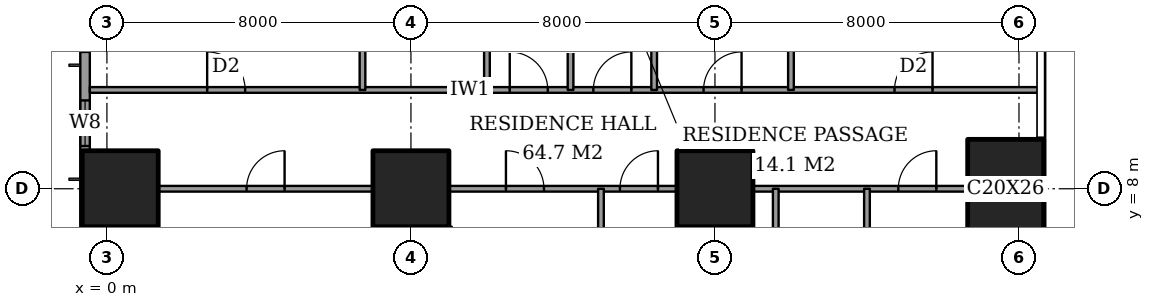
"""IFC4 building model, lengths in metres.
Left out: names, types, materials, properties, quantities, classifications, styles, units other than length and angle.
Written with IfcOpenShell. Run it as: python <this file> out.ifc"""

import sys

from ifc_helpers import new_model, si_unit, direction, frame, frame_2d, origin, origin_2d, place, context, subcontext, project, spatial, rectangle, extrude, element, fill, save


model = new_model("IFC4")
c1 = context("Model", 3, precision=1e-05, world=origin(), true_north=direction((0.0, 1.0)))
c2 = subcontext(c1, "Body", "Model", "MODEL_VIEW")
j1 = project(units=[si_unit("LENGTHUNIT", "METRE"), si_unit("PLANEANGLEUNIT", "RADIAN")], contexts=[c1])
p1 = place(None, origin())
s1 = spatial("IfcSite", under=j1, at=p1, CompositionType="ELEMENT")
p2 = place(p1, origin())
s2 = spatial("IfcBuilding", under=s1, at=p2, CompositionType="ELEMENT")
p3 = place(p2, frame((0.0, 0.0, 44.0)))
s3 = spatial("IfcBuildingStorey", under=s2, at=p3, CompositionType="ELEMENT", Elevation=44.0)
for number, where, z_axis, x_axis in (
    (1, (0.35, 8.0, 0.0), (0.0, 0.0, 1.0), (1.0, 0.0, 0.0)),
    (2, (8.0, 8.0, 0.0), (0.0, 0.0, 1.0), (1.0, 0.0, 0.0)),
    (3, (16.0, 8.0, 0.0), (0.0, 0.0, 1.0), (1.0, 0.0, 0.0)),
):
    element("IfcColumn", number, at=place(p3, frame(where, z_axis=z_axis, x_axis=x_axis)), inside=s3, PredefinedType="COLUMN", context=c2, shape_type="SweptSolid", body=[
        extrude(rectangle(XDim=2.0, YDim=2.0, at=origin_2d()), origin(), (0.0, 0.0, 1.0), 3.6),
    ])
p4 = place(p3, frame((23.65, 8.0, 0.0), z_axis=(0.0, 0.0, 1.0), x_axis=(1.0, 0.0, 0.0)))
e4 = element("IfcColumn", 4, at=p4, inside=s3, PredefinedType="COLUMN", context=c2, shape_type="SweptSolid", body=[
    extrude(rectangle(XDim=2.0, YDim=2.6, at=origin_2d()), origin(), (0.0, 0.0, 1.0), 3.6),
])
p5 = place(p3, frame((-0.575, 44.825, 0.0), z_axis=(0.0, 0.0, 1.0), x_axis=(0.0, -1.0, 0.0)))
e5 = element("IfcWall", 5, at=p5, inside=s3, PredefinedType="SOLIDWALL", context=c2, shape_type="SweptSolid", body=[
    extrude(rectangle(XDim=41.65, YDim=0.25, at=frame_2d((20.825, 0.0))), origin(), (0.0, 0.0, 1.0), 3.6),
])
p6 = place(p5, frame((0.775, 0.0, 0.6)))
e6 = element("IfcOpeningElement", 6, at=p6, cuts=e5, PredefinedType="OPENING", context=c2, shape_type="SweptSolid", body=[
    extrude(rectangle(XDim=2.4, YDim=2.0, at=frame_2d((1.2, 1.0))), frame((0.0, 0.135, 0.0), z_axis=(0.0, -1.0, 0.0), x_axis=(1.0, 0.0, 0.0)), (0.0, 0.0, 1.0), 0.27),
])
p7 = place(p5, frame((6.1, 0.0, 0.6)))
e7 = element("IfcOpeningElement", 7, at=p7, cuts=e5, PredefinedType="OPENING", context=c2, shape_type="SweptSolid", body=[
    extrude(rectangle(XDim=1.2, YDim=2.0, at=frame_2d((0.6, 1.0))), frame((0.0, 0.135, 0.0), z_axis=(0.0, -1.0, 0.0), x_axis=(1.0, 0.0, 0.0)), (0.0, 0.0, 1.0), 0.27),
])
p8 = place(p5, frame((8.425, 0.0, 0.6)))
e8 = element("IfcOpeningElement", 8, at=p8, cuts=e5, PredefinedType="OPENING", context=c2, shape_type="SweptSolid", body=[
    extrude(rectangle(XDim=2.4, YDim=2.0, at=frame_2d((1.2, 1.0))), frame((0.0, 0.135, 0.0), z_axis=(0.0, -1.0, 0.0), x_axis=(1.0, 0.0, 0.0)), (0.0, 0.0, 1.0), 0.27),
])
p9 = place(p5, frame((15.625, 0.0, 0.6)))
e9 = element("IfcOpeningElement", 9, at=p9, cuts=e5, PredefinedType="OPENING", context=c2, shape_type="SweptSolid", body=[
    extrude(rectangle(XDim=2.4, YDim=2.0, at=frame_2d((1.2, 1.0))), frame((0.0, 0.135, 0.0), z_axis=(0.0, -1.0, 0.0), x_axis=(1.0, 0.0, 0.0)), (0.0, 0.0, 1.0), 0.27),
])
p10 = place(p5, frame((23.625, 0.0, 0.6)))
e10 = element("IfcOpeningElement", 10, at=p10, cuts=e5, PredefinedType="OPENING", context=c2, shape_type="SweptSolid", body=[
    extrude(rectangle(XDim=2.4, YDim=2.0, at=frame_2d((1.2, 1.0))), frame((0.0, 0.135, 0.0), z_axis=(0.0, -1.0, 0.0), x_axis=(1.0, 0.0, 0.0)), (0.0, 0.0, 1.0), 0.27),
])
p11 = place(p5, frame((30.825, 0.0, 0.6)))
e11 = element("IfcOpeningElement", 11, at=p11, cuts=e5, PredefinedType="OPENING", context=c2, shape_type="SweptSolid", body=[
    extrude(rectangle(XDim=2.4, YDim=2.0, at=frame_2d((1.2, 1.0))), frame((0.0, 0.135, 0.0), z_axis=(0.0, -1.0, 0.0), x_axis=(1.0, 0.0, 0.0)), (0.0, 0.0, 1.0), 0.27),
])
p12 = place(p5, frame((34.5, 0.0, 0.6)))
e12 = element("IfcOpeningElement", 12, at=p12, cuts=e5, PredefinedType="OPENING", context=c2, shape_type="SweptSolid", body=[
    extrude(rectangle(XDim=1.2, YDim=2.0, at=frame_2d((0.6, 1.0))), frame((0.0, 0.135, 0.0), z_axis=(0.0, -1.0, 0.0), x_axis=(1.0, 0.0, 0.0)), (0.0, 0.0, 1.0), 0.27),
])
p13 = place(p5, frame((38.475, 0.0, 0.6)))
e13 = element("IfcOpeningElement", 13, at=p13, cuts=e5, PredefinedType="OPENING", context=c2, shape_type="SweptSolid", body=[
    extrude(rectangle(XDim=2.4, YDim=2.0, at=frame_2d((1.2, 1.0))), frame((0.0, 0.135, 0.0), z_axis=(0.0, -1.0, 0.0), x_axis=(1.0, 0.0, 0.0)), (0.0, 0.0, 1.0), 0.27),
])
p14 = place(p3, frame((1.35, 8.0, 0.0), z_axis=(0.0, 0.0, 1.0), x_axis=(1.0, 0.0, 0.0)))
e14 = element("IfcWall", 14, at=p14, inside=s3, PredefinedType="PARTITIONING", context=c2, shape_type="SweptSolid", body=[
    extrude(rectangle(XDim=5.65, YDim=0.15, at=frame_2d((2.825, 0.0))), origin(), (0.0, 0.0, 1.0), 3.35),
])
p15 = place(p14, frame((2.325, 0.0, 0.0)))
e15 = element("IfcOpeningElement", 15, at=p15, cuts=e14, PredefinedType="OPENING", context=c2, shape_type="SweptSolid", body=[
    extrude(rectangle(XDim=1.0, YDim=2.1, at=frame_2d((0.5, 1.05))), frame((0.0, 0.085, 0.0), z_axis=(0.0, -1.0, 0.0), x_axis=(1.0, 0.0, 0.0)), (0.0, 0.0, 1.0), 0.17),
])
p16 = place(p3, frame((9.0, 8.0, 0.0), z_axis=(0.0, 0.0, 1.0), x_axis=(1.0, 0.0, 0.0)))
e16 = element("IfcWall", 16, at=p16, inside=s3, PredefinedType="PARTITIONING", context=c2, shape_type="SweptSolid", body=[
    extrude(rectangle(XDim=6.0, YDim=0.15, at=frame_2d((3.0, 0.0))), origin(), (0.0, 0.0, 1.0), 3.35),
])
p17 = place(p16, frame((1.5, 0.0, 0.0)))
e17 = element("IfcOpeningElement", 17, at=p17, cuts=e16, PredefinedType="OPENING", context=c2, shape_type="SweptSolid", body=[
    extrude(rectangle(XDim=1.0, YDim=2.1, at=frame_2d((0.5, 1.05))), frame((0.0, 0.085, 0.0), z_axis=(0.0, -1.0, 0.0), x_axis=(1.0, 0.0, 0.0)), (0.0, 0.0, 1.0), 0.17),
])
p18 = place(p16, frame((4.5, 0.0, 0.0)))
e18 = element("IfcOpeningElement", 18, at=p18, cuts=e16, PredefinedType="OPENING", context=c2, shape_type="SweptSolid", body=[
    extrude(rectangle(XDim=1.0, YDim=2.1, at=frame_2d((0.5, 1.05))), frame((0.0, 0.085, 0.0), z_axis=(0.0, -1.0, 0.0), x_axis=(1.0, 0.0, 0.0)), (0.0, 0.0, 1.0), 0.17),
])
p19 = place(p3, frame((17.0, 8.0, 0.0), z_axis=(0.0, 0.0, 1.0), x_axis=(1.0, 0.0, 0.0)))
e19 = element("IfcWall", 19, at=p19, inside=s3, PredefinedType="PARTITIONING", context=c2, shape_type="SweptSolid", body=[
    extrude(rectangle(XDim=5.65, YDim=0.15, at=frame_2d((2.825, 0.0))), origin(), (0.0, 0.0, 1.0), 3.35),
])
p20 = place(p19, frame((3.825, 0.0, 0.0)))
e20 = element("IfcOpeningElement", 20, at=p20, cuts=e19, PredefinedType="OPENING", context=c2, shape_type="SweptSolid", body=[
    extrude(rectangle(XDim=1.0, YDim=2.1, at=frame_2d((0.5, 1.05))), frame((0.0, 0.085, 0.0), z_axis=(0.0, -1.0, 0.0), x_axis=(1.0, 0.0, 0.0)), (0.0, 0.0, 1.0), 0.17),
])
p21 = place(p3, frame((-0.45, 10.6, 0.0), z_axis=(0.0, 0.0, 1.0), x_axis=(1.0, 0.0, 0.0)))
e21 = element("IfcWall", 21, at=p21, inside=s3, PredefinedType="PARTITIONING", context=c2, shape_type="SweptSolid", body=[
    extrude(rectangle(XDim=25.011, YDim=0.15, at=frame_2d((12.505, 0.0))), origin(), (0.0, 0.0, 1.0), 3.35),
])
p22 = place(p21, frame((13.25, 0.0, 0.0)))
e22 = element("IfcOpeningElement", 22, at=p22, cuts=e21, PredefinedType="OPENING", context=c2, shape_type="SweptSolid", body=[
    extrude(rectangle(XDim=1.0, YDim=2.1, at=frame_2d((0.5, 1.05))), frame((0.0, 0.085, 0.0), z_axis=(0.0, -1.0, 0.0), x_axis=(1.0, 0.0, 0.0)), (0.0, 0.0, 1.0), 0.17),
])
p23 = place(p21, frame((3.087, 0.0, 0.0)))
e23 = element("IfcOpeningElement", 23, at=p23, cuts=e21, PredefinedType="OPENING", context=c2, shape_type="SweptSolid", body=[
    extrude(rectangle(XDim=1.0, YDim=2.1, at=frame_2d((0.5, 1.05))), frame((0.0, 0.085, 0.0), z_axis=(0.0, -1.0, 0.0), x_axis=(1.0, 0.0, 0.0)), (0.0, 0.0, 1.0), 0.17),
])
p24 = place(p21, frame((11.05, 0.0, 0.0)))
e24 = element("IfcOpeningElement", 24, at=p24, cuts=e21, PredefinedType="OPENING", context=c2, shape_type="SweptSolid", body=[
    extrude(rectangle(XDim=1.0, YDim=2.1, at=frame_2d((0.5, 1.05))), frame((0.0, 0.085, 0.0), z_axis=(0.0, -1.0, 0.0), x_axis=(1.0, 0.0, 0.0)), (0.0, 0.0, 1.0), 0.17),
])
p25 = place(p21, frame((16.15, 0.0, 0.0)))
e25 = element("IfcOpeningElement", 25, at=p25, cuts=e21, PredefinedType="OPENING", context=c2, shape_type="SweptSolid", body=[
    extrude(rectangle(XDim=1.0, YDim=2.1, at=frame_2d((0.5, 1.05))), frame((0.0, 0.085, 0.0), z_axis=(0.0, -1.0, 0.0), x_axis=(1.0, 0.0, 0.0)), (0.0, 0.0, 1.0), 0.17),
])
p26 = place(p21, frame((21.175, 0.0, 0.0)))
e26 = element("IfcOpeningElement", 26, at=p26, cuts=e21, PredefinedType="OPENING", context=c2, shape_type="SweptSolid", body=[
    extrude(rectangle(XDim=1.0, YDim=2.1, at=frame_2d((0.5, 1.05))), frame((0.0, 0.085, 0.0), z_axis=(0.0, -1.0, 0.0), x_axis=(1.0, 0.0, 0.0)), (0.0, 0.0, 1.0), 0.17),
])
p27 = place(p3, frame((6.725, 10.6, 0.0), z_axis=(0.0, 0.0, 1.0), x_axis=(0.0, 1.0, 0.0)))
e27 = element("IfcWall", 27, at=p27, inside=s3, PredefinedType="PARTITIONING", context=c2, shape_type="SweptSolid", body=[
    extrude(rectangle(XDim=4.2, YDim=0.15, at=frame_2d((2.1, 0.0))), origin(), (0.0, 0.0, 1.0), 3.35),
])
p28 = place(p27, frame((1.2, 0.0, 0.0)))
e28 = element("IfcOpeningElement", 28, at=p28, cuts=e27, PredefinedType="OPENING", context=c2, shape_type="SweptSolid", body=[
    extrude(rectangle(XDim=0.9, YDim=2.1, at=frame_2d((0.45, 1.05))), frame((0.0, 0.085, 0.0), z_axis=(0.0, -1.0, 0.0), x_axis=(1.0, 0.0, 0.0)), (0.0, 0.0, 1.0), 0.17),
])
p29 = place(p3, frame((10.0, 10.6, 0.0), z_axis=(0.0, 0.0, 1.0), x_axis=(0.0, 1.0, 0.0)))
e29 = element("IfcWall", 29, at=p29, inside=s3, PredefinedType="PARTITIONING", context=c2, shape_type="SweptSolid", body=[
    extrude(rectangle(XDim=11.0, YDim=0.15, at=frame_2d((5.5, 0.0))), origin(), (0.0, 0.0, 1.0), 3.35),
])
p30 = place(p29, frame((8.2, 0.0, 0.0)))
e30 = element("IfcOpeningElement", 30, at=p30, cuts=e29, PredefinedType="OPENING", context=c2, shape_type="SweptSolid", body=[
    extrude(rectangle(XDim=1.0, YDim=2.1, at=frame_2d((0.5, 1.05))), frame((0.0, 0.085, 0.0), z_axis=(0.0, -1.0, 0.0), x_axis=(1.0, 0.0, 0.0)), (0.0, 0.0, 1.0), 0.17),
])
p31 = place(p3, frame((12.2, 10.6, 0.0), z_axis=(0.0, 0.0, 1.0), x_axis=(0.0, 1.0, 0.0)))
e31 = element("IfcWall", 31, at=p31, inside=s3, PredefinedType="PARTITIONING", context=c2, shape_type="SweptSolid", body=[
    extrude(rectangle(XDim=6.4, YDim=0.15, at=frame_2d((3.2, 0.0))), origin(), (0.0, 0.0, 1.0), 3.35),
])
p32 = place(p3, frame((13.0, -0.45, 0.0), z_axis=(0.0, 0.0, 1.0), x_axis=(0.0, 1.0, 0.0)))
e32 = element("IfcWall", 32, at=p32, inside=s3, PredefinedType="PARTITIONING", context=c2, shape_type="SweptSolid", body=[
    extrude(rectangle(XDim=8.45, YDim=0.15, at=frame_2d((4.225, 0.0))), origin(), (0.0, 0.0, 1.0), 3.35),
])
p33 = place(p3, frame((14.4, 10.6, 0.0), z_axis=(0.0, 0.0, 1.0), x_axis=(0.0, 1.0, 0.0)))
e33 = element("IfcWall", 33, at=p33, inside=s3, PredefinedType="PARTITIONING", context=c2, shape_type="SweptSolid", body=[
    extrude(rectangle(XDim=6.4, YDim=0.15, at=frame_2d((3.2, 0.0))), origin(), (0.0, 0.0, 1.0), 3.35),
])
p34 = place(p3, frame((17.6, -0.45, 0.0), z_axis=(0.0, 0.0, 1.0), x_axis=(0.0, 1.0, 0.0)))
e34 = element("IfcWall", 34, at=p34, inside=s3, PredefinedType="PARTITIONING", context=c2, shape_type="SweptSolid", body=[
    extrude(rectangle(XDim=8.45, YDim=0.15, at=frame_2d((4.225, 0.0))), origin(), (0.0, 0.0, 1.0), 3.35),
])
p35 = place(p3, frame((18.0, 10.6, 0.0), z_axis=(0.0, 0.0, 1.0), x_axis=(0.0, 1.0, 0.0)))
e35 = element("IfcWall", 35, at=p35, inside=s3, PredefinedType="PARTITIONING", context=c2, shape_type="SweptSolid", body=[
    extrude(rectangle(XDim=6.4, YDim=0.15, at=frame_2d((3.2, 0.0))), origin(), (0.0, 0.0, 1.0), 3.35),
])
p36 = place(p3, frame((20.0, -0.45, 0.0), z_axis=(0.0, 0.0, 1.0), x_axis=(0.0, 1.0, 0.0)))
e36 = element("IfcWall", 36, at=p36, inside=s3, PredefinedType="PARTITIONING", context=c2, shape_type="SweptSolid", body=[
    extrude(rectangle(XDim=8.45, YDim=0.15, at=frame_2d((4.225, 0.0))), origin(), (0.0, 0.0, 1.0), 3.35),
])
p37 = place(p36, frame((3.775, 0.0, 0.0)))
e37 = element("IfcOpeningElement", 37, at=p37, cuts=e36, PredefinedType="OPENING", context=c2, shape_type="SweptSolid", body=[
    extrude(rectangle(XDim=0.9, YDim=2.1, at=frame_2d((0.45, 1.05))), frame((0.0, 0.085, 0.0), z_axis=(0.0, -1.0, 0.0), x_axis=(1.0, 0.0, 0.0)), (0.0, 0.0, 1.0), 0.17),
])
p38 = place(p12, origin())
e38 = element("IfcWindow", 38, at=p38, inside=s3, PartitioningType="SINGLE_PANEL", PredefinedType="WINDOW", context=c2, shape_type="SweptSolid", body=[
    extrude(rectangle(XDim=1.2, YDim=2.0, at=frame_2d((0.6, 1.0))), frame((0.0, 0.03, 0.0), z_axis=(0.0, -1.0, 0.0), x_axis=(1.0, 0.0, 0.0)), (0.0, 0.0, 1.0), 0.06),
])
fill(e12, e38)
p39 = place(p15, origin())
e39 = element("IfcDoor", 39, at=p39, inside=s3, OperationType="SINGLE_SWING_LEFT", PredefinedType="DOOR", context=c2, shape_type="SweptSolid", body=[
    extrude(rectangle(XDim=1.0, YDim=2.1, at=frame_2d((0.5, 1.05))), frame((0.0, 0.025, 0.0), z_axis=(0.0, -1.0, 0.0), x_axis=(1.0, 0.0, 0.0)), (0.0, 0.0, 1.0), 0.05),
])
fill(e15, e39)
p40 = place(p17, origin())
e40 = element("IfcDoor", 40, at=p40, inside=s3, OperationType="SINGLE_SWING_RIGHT", PredefinedType="DOOR", context=c2, shape_type="SweptSolid", body=[
    extrude(rectangle(XDim=1.0, YDim=2.1, at=frame_2d((0.5, 1.05))), frame((0.0, 0.025, 0.0), z_axis=(0.0, -1.0, 0.0), x_axis=(1.0, 0.0, 0.0)), (0.0, 0.0, 1.0), 0.05),
])
fill(e17, e40)
p41 = place(p18, origin())
e41 = element("IfcDoor", 41, at=p41, inside=s3, OperationType="SINGLE_SWING_LEFT", PredefinedType="DOOR", context=c2, shape_type="SweptSolid", body=[
    extrude(rectangle(XDim=1.0, YDim=2.1, at=frame_2d((0.5, 1.05))), frame((0.0, 0.025, 0.0), z_axis=(0.0, -1.0, 0.0), x_axis=(1.0, 0.0, 0.0)), (0.0, 0.0, 1.0), 0.05),
])
fill(e18, e41)
p42 = place(p20, origin())
e42 = element("IfcDoor", 42, at=p42, inside=s3, OperationType="SINGLE_SWING_LEFT", PredefinedType="DOOR", context=c2, shape_type="SweptSolid", body=[
    extrude(rectangle(XDim=1.0, YDim=2.1, at=frame_2d((0.5, 1.05))), frame((0.0, 0.025, 0.0), z_axis=(0.0, -1.0, 0.0), x_axis=(1.0, 0.0, 0.0)), (0.0, 0.0, 1.0), 0.05),
])
fill(e20, e42)
p43 = place(p22, origin())
e43 = element("IfcDoor", 43, at=p43, inside=s3, OperationType="SINGLE_SWING_LEFT", PredefinedType="DOOR", context=c2, shape_type="SweptSolid", body=[
    extrude(rectangle(XDim=1.0, YDim=2.1, at=frame_2d((0.5, 1.05))), frame((0.0, 0.025, 0.0), z_axis=(0.0, -1.0, 0.0), x_axis=(1.0, 0.0, 0.0)), (0.0, 0.0, 1.0), 0.05),
])
fill(e22, e43)
p44 = place(p23, origin())
e44 = element("IfcDoor", 44, at=p44, inside=s3, OperationType="SINGLE_SWING_RIGHT", PredefinedType="DOOR", context=c2, shape_type="SweptSolid", body=[
    extrude(rectangle(XDim=1.0, YDim=2.1, at=frame_2d((0.5, 1.05))), frame((0.0, 0.025, 0.0), z_axis=(0.0, -1.0, 0.0), x_axis=(1.0, 0.0, 0.0)), (0.0, 0.0, 1.0), 0.05),
])
fill(e23, e44)
p45 = place(p24, origin())
e45 = element("IfcDoor", 45, at=p45, inside=s3, OperationType="SINGLE_SWING_RIGHT", PredefinedType="DOOR", context=c2, shape_type="SweptSolid", body=[
    extrude(rectangle(XDim=1.0, YDim=2.1, at=frame_2d((0.5, 1.05))), frame((0.0, 0.025, 0.0), z_axis=(0.0, -1.0, 0.0), x_axis=(1.0, 0.0, 0.0)), (0.0, 0.0, 1.0), 0.05),
])
fill(e24, e45)
p46 = place(p25, origin())
e46 = element("IfcDoor", 46, at=p46, inside=s3, OperationType="SINGLE_SWING_LEFT", PredefinedType="DOOR", context=c2, shape_type="SweptSolid", body=[
    extrude(rectangle(XDim=1.0, YDim=2.1, at=frame_2d((0.5, 1.05))), frame((0.0, 0.025, 0.0), z_axis=(0.0, -1.0, 0.0), x_axis=(1.0, 0.0, 0.0)), (0.0, 0.0, 1.0), 0.05),
])
fill(e25, e46)
p47 = place(p26, origin())
e47 = element("IfcDoor", 47, at=p47, inside=s3, OperationType="SINGLE_SWING_LEFT", PredefinedType="DOOR", context=c2, shape_type="SweptSolid", body=[
    extrude(rectangle(XDim=1.0, YDim=2.1, at=frame_2d((0.5, 1.05))), frame((0.0, 0.025, 0.0), z_axis=(0.0, -1.0, 0.0), x_axis=(1.0, 0.0, 0.0)), (0.0, 0.0, 1.0), 0.05),
])
fill(e26, e47)
save(model, sys.argv[1])
